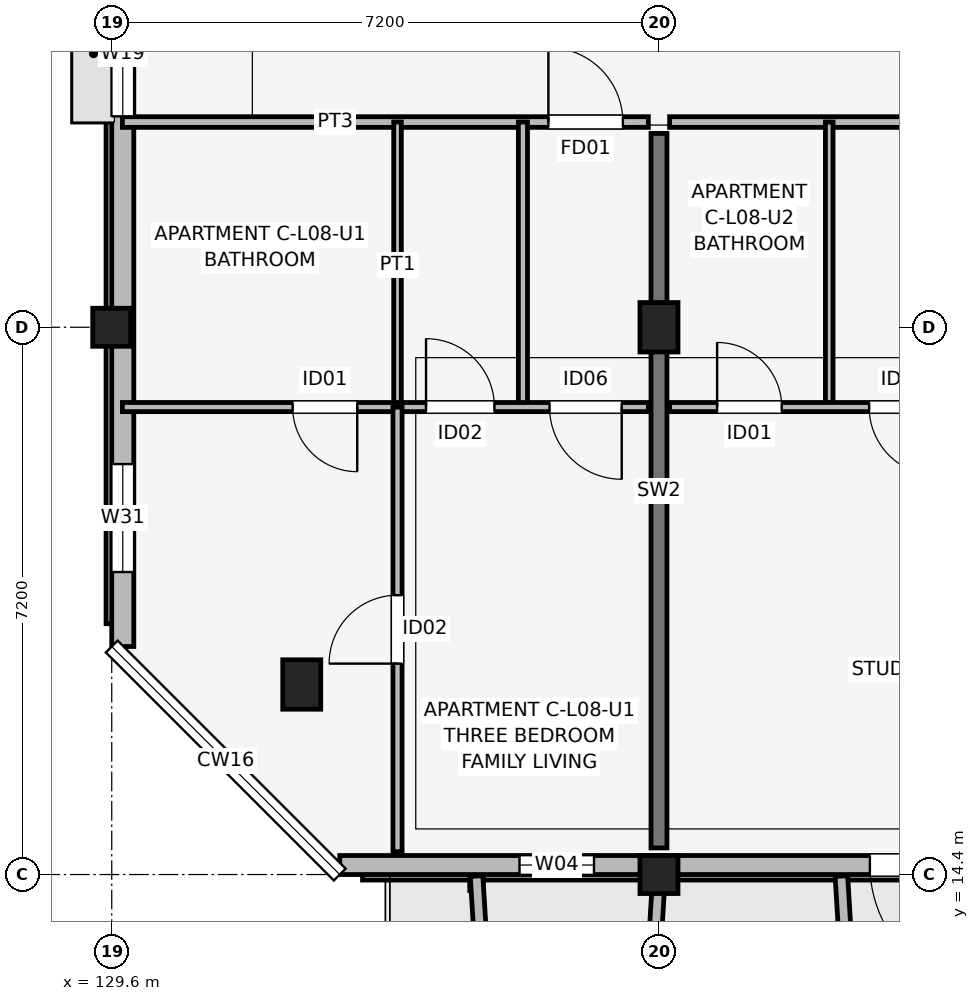
"""IFC4 building model, lengths in metres.
Left out: names, types, materials, properties, quantities, classifications, styles, units other than length and angle.
Written with IfcOpenShell. Run it as: python <this file> out.ifc"""

import sys

from ifc_helpers import new_model, si_unit, direction, frame, frame_2d, origin, origin_2d, place, context, subcontext, project, spatial, rectangle, extrude, element, fill, save


model = new_model("IFC4")
c1 = context("Model", 3, precision=1e-05, world=origin(), true_north=direction((0.0, 1.0)))
c2 = subcontext(c1, "Body", "Model", "MODEL_VIEW")
j1 = project(units=[si_unit("LENGTHUNIT", "METRE"), si_unit("PLANEANGLEUNIT", "RADIAN")], contexts=[c1])
p1 = place(None, origin())
s1 = spatial("IfcSite", under=j1, at=p1, CompositionType="ELEMENT")
p2 = place(p1, origin())
s2 = spatial("IfcBuilding", under=s1, at=p2, CompositionType="ELEMENT")
p3 = place(p2, frame((0.0, 0.0, 27.6)))
s3 = spatial("IfcBuildingStorey", under=s2, at=p3, CompositionType="ELEMENT", Elevation=27.6)
p4 = place(p3, frame((132.1, 16.9, 0.0), z_axis=(0.0, 0.0, 1.0), x_axis=(1.0, 0.0, 0.0)))
e1 = element("IfcColumn", 1, at=p4, inside=s3, PredefinedType="COLUMN", context=c2, shape_type="SweptSolid", body=[
    extrude(rectangle(XDim=0.5, YDim=0.65, at=origin_2d()), origin(), (0.0, 0.0, 1.0), 3.15),
])
for number, where, z_axis, x_axis in (
    (2, (129.6, 21.6, 0.0), (0.0, 0.0, 1.0), (1.0, 0.0, 0.0)),
    (3, (136.8, 14.4, 0.0), (0.0, 0.0, 1.0), (1.0, 0.0, 0.0)),
):
    element("IfcColumn", number, at=place(p3, frame(where, z_axis=z_axis, x_axis=x_axis)), inside=s3, PredefinedType="COLUMN", context=c2, shape_type="SweptSolid", body=[
        extrude(rectangle(XDim=0.5, YDim=0.5, at=origin_2d()), origin(), (0.0, 0.0, 1.0), 3.15),
    ])
p5 = place(p3, frame((136.8, 21.6, 0.0), z_axis=(0.0, 0.0, 1.0), x_axis=(1.0, 0.0, 0.0)))
e4 = element("IfcColumn", 4, at=p5, inside=s3, PredefinedType="COLUMN", context=c2, shape_type="SweptSolid", body=[
    extrude(rectangle(XDim=0.5, YDim=0.65, at=origin_2d()), origin(), (0.0, 0.0, 1.0), 3.15),
])
p6 = place(p3, frame((136.8, 14.75, 0.0), z_axis=(0.0, 0.0, 1.0), x_axis=(0.0, 1.0, 0.0)))
e5 = element("IfcWall", 5, at=p6, inside=s3, PredefinedType="SHEAR", context=c2, shape_type="SweptSolid", body=[
    extrude(rectangle(XDim=9.4, YDim=0.21, at=frame_2d((4.7, 0.0))), origin(), (0.0, 0.0, 1.0), 3.15),
])
p7 = place(p3, frame((132.6, 14.525, 0.0), z_axis=(0.0, 0.0, 1.0), x_axis=(1.0, 0.0, 0.0)))
e6 = element("IfcWall", 6, at=p7, inside=s3, PredefinedType="SOLIDWALL", context=c2, shape_type="SweptSolid", body=[
    extrude(rectangle(XDim=30.0, YDim=0.25, at=frame_2d((15.0, 0.0))), origin(), (0.0, 0.0, 1.0), 2.43),
])
p8 = place(p7, frame((8.625, 0.0, 0.0), z_axis=(0.0, 0.0, 1.0), x_axis=(-1.0, 0.0, 0.0)))
e7 = element("IfcOpeningElement", 7, at=p8, cuts=e6, PredefinedType="OPENING", context=c2, shape_type="SweptSolid", body=[
    extrude(rectangle(XDim=1.65, YDim=2.15, at=frame_2d((0.825, 1.075))), frame((0.0, 0.135, 0.0), z_axis=(0.0, -1.0, 0.0), x_axis=(1.0, 0.0, 0.0)), (0.0, 0.0, 1.0), 0.27),
])
p9 = place(p7, frame((22.95, 0.0, 0.0), z_axis=(0.0, 0.0, 1.0), x_axis=(-1.0, 0.0, 0.0)))
e8 = element("IfcOpeningElement", 8, at=p9, cuts=e6, PredefinedType="OPENING", context=c2, shape_type="SweptSolid", body=[
    extrude(rectangle(XDim=1.5, YDim=2.15, at=frame_2d((0.75, 1.075))), frame((0.0, 0.135, 0.0), z_axis=(0.0, -1.0, 0.0), x_axis=(1.0, 0.0, 0.0)), (0.0, 0.0, 1.0), 0.27),
])
p10 = place(p7, frame((2.365, 0.0, 0.75)))
e9 = element("IfcOpeningElement", 9, at=p10, cuts=e6, PredefinedType="OPENING", context=c2, shape_type="SweptSolid", body=[
    extrude(rectangle(XDim=0.98, YDim=1.45, at=frame_2d((0.49, 0.725))), frame((0.0, 0.135, 0.0), z_axis=(0.0, -1.0, 0.0), x_axis=(1.0, 0.0, 0.0)), (0.0, 0.0, 1.0), 0.27),
])
p11 = place(p7, frame((12.11, 0.0, 0.75)))
e10 = element("IfcOpeningElement", 10, at=p11, cuts=e6, PredefinedType="OPENING", context=c2, shape_type="SweptSolid", body=[
    extrude(rectangle(XDim=1.1, YDim=1.5, at=frame_2d((0.55, 0.75))), frame((0.0, 0.135, 0.0), z_axis=(0.0, -1.0, 0.0), x_axis=(1.0, 0.0, 0.0)), (0.0, 0.0, 1.0), 0.27),
])
p12 = place(p7, frame((13.925, 0.0, 0.67)))
e11 = element("IfcOpeningElement", 11, at=p12, cuts=e6, PredefinedType="OPENING", context=c2, shape_type="SweptSolid", body=[
    extrude(rectangle(XDim=2.15, YDim=1.65, at=frame_2d((1.075, 0.825))), frame((0.0, 0.135, 0.0), z_axis=(0.0, -1.0, 0.0), x_axis=(1.0, 0.0, 0.0)), (0.0, 0.0, 1.0), 0.27),
])
p13 = place(p7, frame((26.355, 0.0, 0.7)))
e12 = element("IfcOpeningElement", 12, at=p13, cuts=e6, PredefinedType="OPENING", context=c2, shape_type="SweptSolid", body=[
    extrude(rectangle(XDim=1.58, YDim=1.6, at=frame_2d((0.79, 0.8))), frame((0.0, 0.135, 0.0), z_axis=(0.0, -1.0, 0.0), x_axis=(1.0, 0.0, 0.0)), (0.0, 0.0, 1.0), 0.27),
])
p14 = place(p3, frame((129.745, 33.0, 0.0), z_axis=(0.0, 0.0, 1.0), x_axis=(0.0, -1.0, 0.0)))
e13 = element("IfcWall", 13, at=p14, inside=s3, PredefinedType="SOLIDWALL", context=c2, shape_type="SweptSolid", body=[
    extrude(rectangle(XDim=15.6, YDim=0.29, at=frame_2d((7.8, 0.0))), origin(), (0.0, 0.0, 1.0), 2.43),
])
p15 = place(p14, frame((6.975, 0.0, 1.05)))
e14 = element("IfcOpeningElement", 14, at=p15, cuts=e13, PredefinedType="OPENING", context=c2, shape_type="SweptSolid", body=[
    extrude(rectangle(XDim=1.65, YDim=1.15, at=frame_2d((0.825, 0.575))), frame((0.0, 0.155, 0.0), z_axis=(0.0, -1.0, 0.0), x_axis=(1.0, 0.0, 0.0)), (0.0, 0.0, 1.0), 0.31),
])
p16 = place(p14, frame((13.2, 0.0, 0.72)))
e15 = element("IfcOpeningElement", 15, at=p16, cuts=e13, PredefinedType="OPENING", context=c2, shape_type="SweptSolid", body=[
    extrude(rectangle(XDim=1.42, YDim=1.6, at=frame_2d((0.71, 0.8))), frame((0.0, 0.155, 0.0), z_axis=(0.0, -1.0, 0.0), x_axis=(1.0, 0.0, 0.0)), (0.0, 0.0, 1.0), 0.31),
])
for number, where, z_axis, x_axis in (
    (16, (134.4, 14.38, 0.0), (0.0, 0.0, 1.0), (0.061, -0.998, 0.0)),
    (17, (136.8, 14.38, 0.0), (0.0, 0.0, 1.0), (-0.061, -0.998, 0.0)),
):
    element("IfcWall", number, at=place(p3, frame(where, z_axis=z_axis, x_axis=x_axis)), inside=s3, PredefinedType="ELEMENTEDWALL", context=c2, shape_type="SweptSolid", body=[
        extrude(rectangle(XDim=1.964, YDim=0.165, at=frame_2d((0.982, 0.0))), origin(), (0.0, 0.0, 1.0), 2.95),
    ])
p17 = place(p3, frame((139.2, 14.38, 0.0), z_axis=(0.0, 0.0, 1.0), x_axis=(0.061170732449, -0.998127317276, 0.0)))
e18 = element("IfcWall", 18, at=p17, inside=s3, PredefinedType="ELEMENTEDWALL", context=c2, shape_type="SweptSolid", body=[
    extrude(rectangle(XDim=1.964, YDim=0.165, at=frame_2d((0.982, 0.0))), origin(), (0.0, 0.0, 1.0), 2.53),
])
p18 = place(p3, frame((129.74, 24.3, 0.0), z_axis=(0.0, 0.0, 1.0), x_axis=(1.0, 0.0, 0.0)))
e19 = element("IfcWall", 19, at=p18, inside=s3, PredefinedType="PARTITIONING", context=c2, shape_type="SweptSolid", body=[
    extrude(rectangle(XDim=6.92, YDim=0.14, at=frame_2d((3.46, 0.0))), origin(), (0.0, 0.0, 1.0), 2.38),
])
p19 = place(p18, frame((5.605, 0.0, 0.0)))
e20 = element("IfcOpeningElement", 20, at=p19, cuts=e19, PredefinedType="OPENING", context=c2, shape_type="SweptSolid", body=[
    extrude(rectangle(XDim=0.98, YDim=2.1, at=frame_2d((0.49, 1.05))), frame((0.0, 0.08, 0.0), z_axis=(0.0, -1.0, 0.0), x_axis=(1.0, 0.0, 0.0)), (0.0, 0.0, 1.0), 0.16),
])
p20 = place(p3, frame((133.36, 20.55, 0.0), z_axis=(0.0, 0.0, 1.0), x_axis=(0.0, 1.0, 0.0)))
e21 = element("IfcWall", 21, at=p20, inside=s3, PredefinedType="PARTITIONING", context=c2, shape_type="SweptSolid", body=[
    extrude(rectangle(XDim=3.75, YDim=0.1, at=frame_2d((1.875, 0.0))), origin(), (0.0, 0.0, 1.0), 2.38),
])
p21 = place(p3, frame((135.01, 20.55, 0.0), z_axis=(0.0, 0.0, 1.0), x_axis=(0.0, 1.0, 0.0)))
e22 = element("IfcWall", 22, at=p21, inside=s3, PredefinedType="PARTITIONING", context=c2, shape_type="SweptSolid", body=[
    extrude(rectangle(XDim=3.75, YDim=0.12, at=frame_2d((1.875, 0.0))), origin(), (0.0, 0.0, 1.0), 2.38),
])
p22 = place(p3, frame((129.74, 20.55, 0.0), z_axis=(0.0, 0.0, 1.0), x_axis=(1.0, 0.0, 0.0)))
e23 = element("IfcWall", 23, at=p22, inside=s3, PredefinedType="PARTITIONING", context=c2, shape_type="SweptSolid", body=[
    extrude(rectangle(XDim=6.92, YDim=0.12, at=frame_2d((3.46, 0.0))), origin(), (0.0, 0.0, 1.0), 2.38),
])
p23 = place(p22, frame((3.09, 0.0, 0.0), z_axis=(0.0, 0.0, 1.0), x_axis=(-1.0, 0.0, 0.0)))
e24 = element("IfcOpeningElement", 24, at=p23, cuts=e23, PredefinedType="OPENING", context=c2, shape_type="SweptSolid", body=[
    extrude(rectangle(XDim=0.85, YDim=2.08, at=frame_2d((0.425, 1.04))), frame((0.0, 0.07, 0.0), z_axis=(0.0, -1.0, 0.0), x_axis=(1.0, 0.0, 0.0)), (0.0, 0.0, 1.0), 0.14),
])
p24 = place(p22, frame((3.995, 0.0, 0.0)))
e25 = element("IfcOpeningElement", 25, at=p24, cuts=e23, PredefinedType="OPENING", context=c2, shape_type="SweptSolid", body=[
    extrude(rectangle(XDim=0.9, YDim=2.08, at=frame_2d((0.45, 1.04))), frame((0.0, 0.07, 0.0), z_axis=(0.0, -1.0, 0.0), x_axis=(1.0, 0.0, 0.0)), (0.0, 0.0, 1.0), 0.14),
])
p25 = place(p22, frame((6.57, 0.0, 0.0), z_axis=(0.0, 0.0, 1.0), x_axis=(-1.0, 0.0, 0.0)))
e26 = element("IfcOpeningElement", 26, at=p25, cuts=e23, PredefinedType="OPENING", context=c2, shape_type="SweptSolid", body=[
    extrude(rectangle(XDim=0.95, YDim=2.08, at=frame_2d((0.475, 1.04))), frame((0.0, 0.07, 0.0), z_axis=(0.0, -1.0, 0.0), x_axis=(1.0, 0.0, 0.0)), (0.0, 0.0, 1.0), 0.14),
])
p26 = place(p3, frame((133.36, 14.7, 0.0), z_axis=(0.0, 0.0, 1.0), x_axis=(0.0, 1.0, 0.0)))
e27 = element("IfcWall", 27, at=p26, inside=s3, PredefinedType="PARTITIONING", context=c2, shape_type="SweptSolid", body=[
    extrude(rectangle(XDim=5.85, YDim=0.12, at=frame_2d((2.925, 0.0))), origin(), (0.0, 0.0, 1.0), 2.38),
])
p27 = place(p26, frame((2.475, 0.0, 0.0)))
e28 = element("IfcOpeningElement", 28, at=p27, cuts=e27, PredefinedType="OPENING", context=c2, shape_type="SweptSolid", body=[
    extrude(rectangle(XDim=0.9, YDim=2.08, at=frame_2d((0.45, 1.04))), frame((0.0, 0.07, 0.0), z_axis=(0.0, -1.0, 0.0), x_axis=(1.0, 0.0, 0.0)), (0.0, 0.0, 1.0), 0.14),
])
p28 = place(p3, frame((136.94, 24.3, 0.0), z_axis=(0.0, 0.0, 1.0), x_axis=(1.0, 0.0, 0.0)))
e29 = element("IfcWall", 29, at=p28, inside=s3, PredefinedType="PARTITIONING", context=c2, shape_type="SweptSolid", body=[
    extrude(rectangle(XDim=6.92, YDim=0.14, at=frame_2d((3.46, 0.0))), origin(), (0.0, 0.0, 1.0), 2.38),
])
p29 = place(p28, frame((5.975, 0.0, 0.0), z_axis=(0.0, 0.0, 1.0), x_axis=(-1.0, 0.0, 0.0)))
e30 = element("IfcOpeningElement", 30, at=p29, cuts=e29, PredefinedType="OPENING", context=c2, shape_type="SweptSolid", body=[
    extrude(rectangle(XDim=0.98, YDim=2.1, at=frame_2d((0.49, 1.05))), frame((0.0, 0.08, 0.0), z_axis=(0.0, -1.0, 0.0), x_axis=(1.0, 0.0, 0.0)), (0.0, 0.0, 1.0), 0.16),
])
p30 = place(p3, frame((139.04, 20.55, 0.0), z_axis=(0.0, 0.0, 1.0), x_axis=(0.0, 1.0, 0.0)))
e31 = element("IfcWall", 31, at=p30, inside=s3, PredefinedType="PARTITIONING", context=c2, shape_type="SweptSolid", body=[
    extrude(rectangle(XDim=3.75, YDim=0.1, at=frame_2d((1.875, 0.0))), origin(), (0.0, 0.0, 1.0), 2.38),
])
p31 = place(p3, frame((136.94, 20.55, 0.0), z_axis=(0.0, 0.0, 1.0), x_axis=(1.0, 0.0, 0.0)))
e32 = element("IfcWall", 32, at=p31, inside=s3, PredefinedType="PARTITIONING", context=c2, shape_type="SweptSolid", body=[
    extrude(rectangle(XDim=6.92, YDim=0.12, at=frame_2d((3.46, 0.0))), origin(), (0.0, 0.0, 1.0), 2.38),
])
p32 = place(p31, frame((0.625, 0.0, 0.0)))
e33 = element("IfcOpeningElement", 33, at=p32, cuts=e32, PredefinedType="OPENING", context=c2, shape_type="SweptSolid", body=[
    extrude(rectangle(XDim=0.85, YDim=2.08, at=frame_2d((0.425, 1.04))), frame((0.0, 0.07, 0.0), z_axis=(0.0, -1.0, 0.0), x_axis=(1.0, 0.0, 0.0)), (0.0, 0.0, 1.0), 0.14),
])
p33 = place(p31, frame((3.525, 0.0, 0.0), z_axis=(0.0, 0.0, 1.0), x_axis=(-1.0, 0.0, 0.0)))
e34 = element("IfcOpeningElement", 34, at=p33, cuts=e32, PredefinedType="OPENING", context=c2, shape_type="SweptSolid", body=[
    extrude(rectangle(XDim=0.9, YDim=2.08, at=frame_2d((0.45, 1.04))), frame((0.0, 0.07, 0.0), z_axis=(0.0, -1.0, 0.0), x_axis=(1.0, 0.0, 0.0)), (0.0, 0.0, 1.0), 0.14),
])
p34 = place(p31, frame((5.01, 0.0, 0.0)))
e35 = element("IfcOpeningElement", 35, at=p34, cuts=e32, PredefinedType="OPENING", context=c2, shape_type="SweptSolid", body=[
    extrude(rectangle(XDim=0.95, YDim=2.08, at=frame_2d((0.475, 1.04))), frame((0.0, 0.07, 0.0), z_axis=(0.0, -1.0, 0.0), x_axis=(1.0, 0.0, 0.0)), (0.0, 0.0, 1.0), 0.14),
])
p35 = place(p8, origin())
e36 = element("IfcDoor", 36, at=p35, inside=s3, OperationType="SINGLE_SWING_RIGHT", PredefinedType="DOOR", context=c2, shape_type="SweptSolid", body=[
    extrude(rectangle(XDim=1.65, YDim=2.15, at=frame_2d((0.825, 1.075))), frame((0.0, 0.025, 0.0), z_axis=(0.0, -1.0, 0.0), x_axis=(1.0, 0.0, 0.0)), (0.0, 0.0, 1.0), 0.05),
])
fill(e7, e36)
p36 = place(p10, origin())
e37 = element("IfcWindow", 37, at=p36, inside=s3, PartitioningType="SINGLE_PANEL", PredefinedType="WINDOW", context=c2, shape_type="SweptSolid", body=[
    extrude(rectangle(XDim=0.98, YDim=1.45, at=frame_2d((0.49, 0.725))), frame((0.0, 0.03, 0.0), z_axis=(0.0, -1.0, 0.0), x_axis=(1.0, 0.0, 0.0)), (0.0, 0.0, 1.0), 0.06),
])
fill(e9, e37)
p37 = place(p15, origin())
e38 = element("IfcWindow", 38, at=p37, inside=s3, PartitioningType="SINGLE_PANEL", PredefinedType="WINDOW", context=c2, shape_type="SweptSolid", body=[
    extrude(rectangle(XDim=1.65, YDim=1.15, at=frame_2d((0.825, 0.575))), frame((0.0, 0.03, 0.0), z_axis=(0.0, -1.0, 0.0), x_axis=(1.0, 0.0, 0.0)), (0.0, 0.0, 1.0), 0.06),
])
fill(e14, e38)
p38 = place(p16, origin())
e39 = element("IfcWindow", 39, at=p38, inside=s3, PartitioningType="SINGLE_PANEL", PredefinedType="WINDOW", context=c2, shape_type="SweptSolid", body=[
    extrude(rectangle(XDim=1.42, YDim=1.6, at=frame_2d((0.71, 0.8))), frame((0.0, 0.03, 0.0), z_axis=(0.0, -1.0, 0.0), x_axis=(1.0, 0.0, 0.0)), (0.0, 0.0, 1.0), 0.06),
])
fill(e15, e39)
p39 = place(p19, origin())
e40 = element("IfcDoor", 40, at=p39, inside=s3, OperationType="SINGLE_SWING_LEFT", PredefinedType="DOOR", context=c2, shape_type="SweptSolid", body=[
    extrude(rectangle(XDim=0.98, YDim=2.1, at=frame_2d((0.49, 1.05))), frame((0.0, 0.025, 0.0), z_axis=(0.0, -1.0, 0.0), x_axis=(1.0, 0.0, 0.0)), (0.0, 0.0, 1.0), 0.05),
])
fill(e20, e40)
p40 = place(p23, origin())
e41 = element("IfcDoor", 41, at=p40, inside=s3, OperationType="SINGLE_SWING_RIGHT", PredefinedType="DOOR", context=c2, shape_type="SweptSolid", body=[
    extrude(rectangle(XDim=0.85, YDim=2.08, at=frame_2d((0.425, 1.04))), frame((0.0, 0.025, 0.0), z_axis=(0.0, -1.0, 0.0), x_axis=(1.0, 0.0, 0.0)), (0.0, 0.0, 1.0), 0.05),
])
fill(e24, e41)
p41 = place(p24, origin())
e42 = element("IfcDoor", 42, at=p41, inside=s3, OperationType="SINGLE_SWING_LEFT", PredefinedType="DOOR", context=c2, shape_type="SweptSolid", body=[
    extrude(rectangle(XDim=0.9, YDim=2.08, at=frame_2d((0.45, 1.04))), frame((0.0, 0.025, 0.0), z_axis=(0.0, -1.0, 0.0), x_axis=(1.0, 0.0, 0.0)), (0.0, 0.0, 1.0), 0.05),
])
fill(e25, e42)
p42 = place(p25, origin())
e43 = element("IfcDoor", 43, at=p42, inside=s3, OperationType="SINGLE_SWING_RIGHT", PredefinedType="DOOR", context=c2, shape_type="SweptSolid", body=[
    extrude(rectangle(XDim=0.95, YDim=2.08, at=frame_2d((0.475, 1.04))), frame((0.0, 0.025, 0.0), z_axis=(0.0, -1.0, 0.0), x_axis=(1.0, 0.0, 0.0)), (0.0, 0.0, 1.0), 0.05),
])
fill(e26, e43)
p43 = place(p27, origin())
e44 = element("IfcDoor", 44, at=p43, inside=s3, OperationType="SINGLE_SWING_LEFT", PredefinedType="DOOR", context=c2, shape_type="SweptSolid", body=[
    extrude(rectangle(XDim=0.9, YDim=2.08, at=frame_2d((0.45, 1.04))), frame((0.0, 0.025, 0.0), z_axis=(0.0, -1.0, 0.0), x_axis=(1.0, 0.0, 0.0)), (0.0, 0.0, 1.0), 0.05),
])
fill(e28, e44)
p44 = place(p32, origin())
e45 = element("IfcDoor", 45, at=p44, inside=s3, OperationType="SINGLE_SWING_LEFT", PredefinedType="DOOR", context=c2, shape_type="SweptSolid", body=[
    extrude(rectangle(XDim=0.85, YDim=2.08, at=frame_2d((0.425, 1.04))), frame((0.0, 0.025, 0.0), z_axis=(0.0, -1.0, 0.0), x_axis=(1.0, 0.0, 0.0)), (0.0, 0.0, 1.0), 0.05),
])
fill(e33, e45)
p45 = place(p33, origin())
e46 = element("IfcDoor", 46, at=p45, inside=s3, OperationType="SINGLE_SWING_RIGHT", PredefinedType="DOOR", context=c2, shape_type="SweptSolid", body=[
    extrude(rectangle(XDim=0.9, YDim=2.08, at=frame_2d((0.45, 1.04))), frame((0.0, 0.025, 0.0), z_axis=(0.0, -1.0, 0.0), x_axis=(1.0, 0.0, 0.0)), (0.0, 0.0, 1.0), 0.05),
])
fill(e34, e46)
save(model, sys.argv[1])
